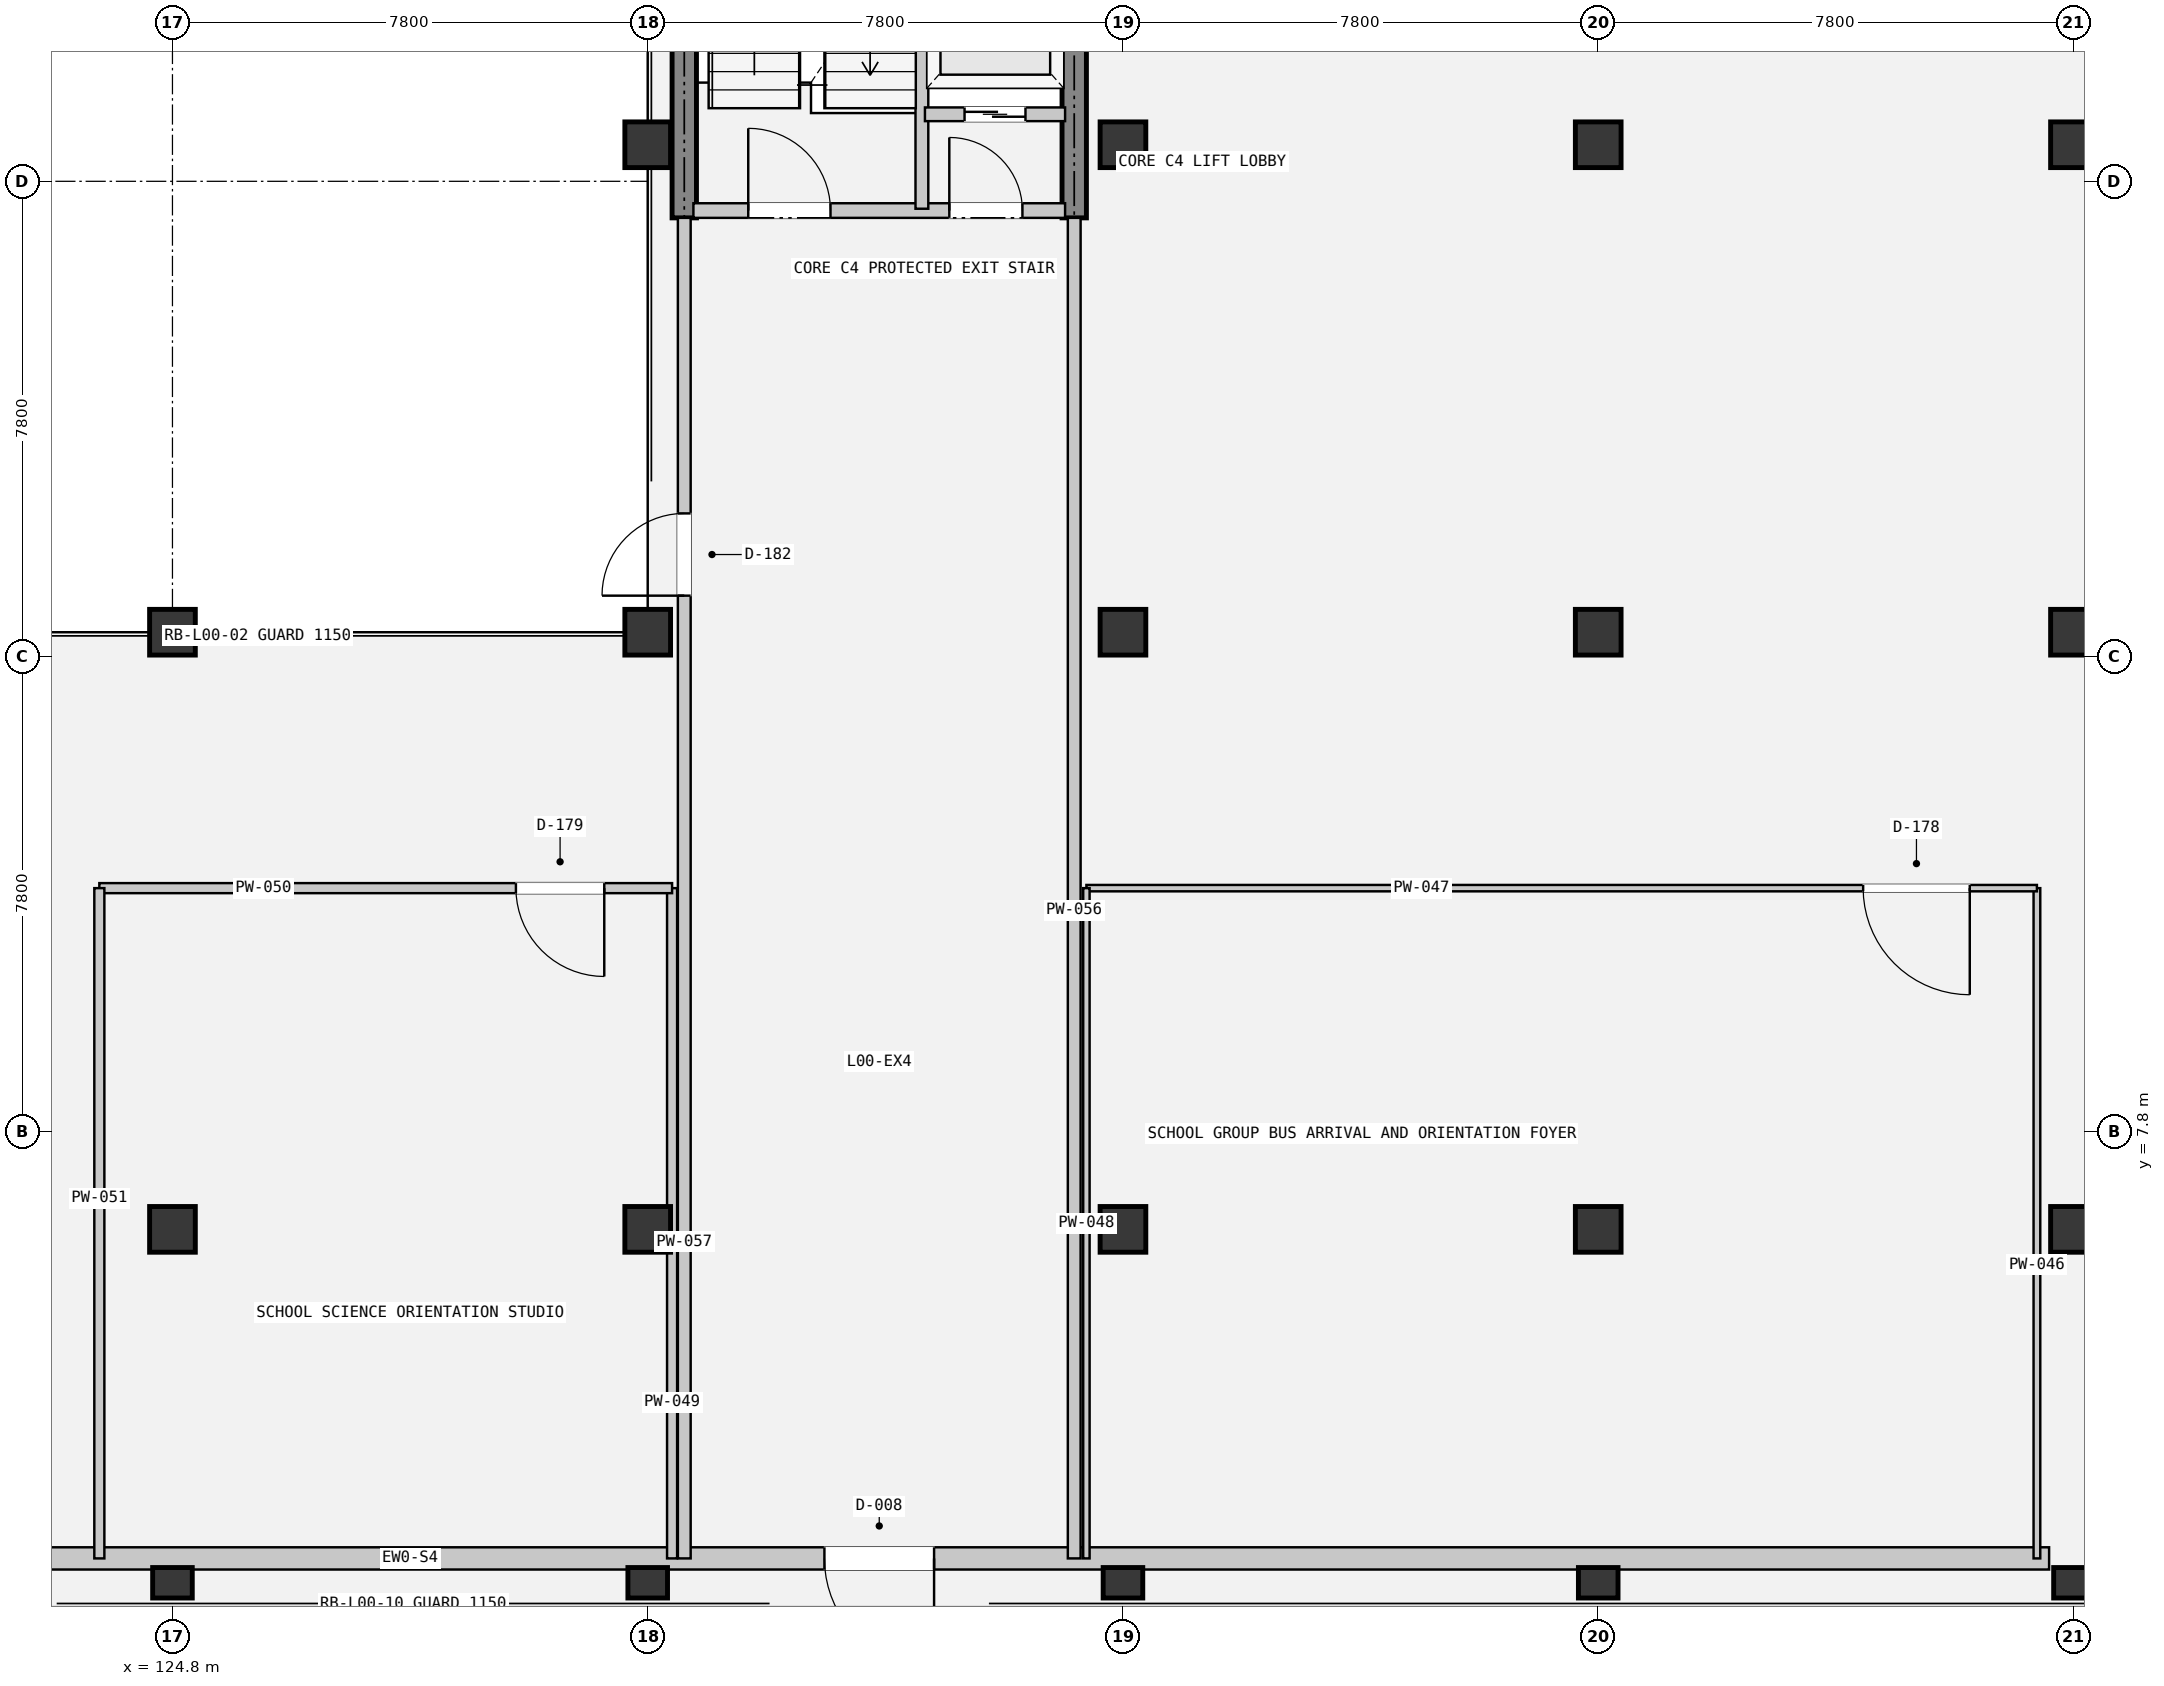
"""IFC4 building model, lengths in metres.
Left out: names, types, materials, properties, quantities, classifications, styles, units other than length and angle.
Written with IfcOpenShell. Run it as: python <this file> out.ifc"""

import sys

from ifc_helpers import new_model, si_unit, direction, frame, frame_2d, origin, origin_2d, place, context, subcontext, project, spatial, rectangle, extrude, element, fill, save


model = new_model("IFC4")
c1 = context("Model", 3, precision=1e-05, world=origin(), true_north=direction((0.0, 1.0)))
c2 = subcontext(c1, "Body", "Model", "MODEL_VIEW")
j1 = project(units=[si_unit("LENGTHUNIT", "METRE"), si_unit("PLANEANGLEUNIT", "RADIAN")], contexts=[c1])
p1 = place(None, origin())
s1 = spatial("IfcSite", under=j1, at=p1, CompositionType="ELEMENT")
p2 = place(p1, origin())
s2 = spatial("IfcBuilding", under=s1, at=p2, CompositionType="ELEMENT")
p3 = place(p2, origin())
s3 = spatial("IfcBuildingStorey", under=s2, at=p3, CompositionType="ELEMENT", Elevation=0.0)
p4 = place(p3, frame((124.8, 0.4, 0.0), z_axis=(0.0, 0.0, 1.0), x_axis=(1.0, 0.0, 0.0)))
e1 = element("IfcColumn", 1, at=p4, inside=s3, PredefinedType="COLUMN", context=c2, shape_type="SweptSolid", body=[
    extrude(rectangle(XDim=0.65, YDim=0.5, at=origin_2d()), origin(), (0.0, 0.0, 1.0), 5.4),
])
for number, where, z_axis, x_axis in (
    (2, (124.8, 6.2, 0.0), (0.0, 0.0, 1.0), (1.0, 0.0, 0.0)),
    (3, (124.8, 16.0, 0.0), (0.0, 0.0, 1.0), (1.0, 0.0, 0.0)),
):
    element("IfcColumn", number, at=place(p3, frame(where, z_axis=z_axis, x_axis=x_axis)), inside=s3, PredefinedType="COLUMN", context=c2, shape_type="SweptSolid", body=[
        extrude(rectangle(XDim=0.75, YDim=0.75, at=origin_2d()), origin(), (0.0, 0.0, 1.0), 5.4),
    ])
p5 = place(p3, frame((132.6, 0.4, 0.0), z_axis=(0.0, 0.0, 1.0), x_axis=(1.0, 0.0, 0.0)))
e4 = element("IfcColumn", 4, at=p5, inside=s3, PredefinedType="COLUMN", context=c2, shape_type="SweptSolid", body=[
    extrude(rectangle(XDim=0.65, YDim=0.5, at=origin_2d()), origin(), (0.0, 0.0, 1.0), 5.4),
])
for number, where, z_axis, x_axis in (
    (5, (132.6, 6.2, 0.0), (0.0, 0.0, 1.0), (1.0, 0.0, 0.0)),
    (6, (132.6, 16.0, 0.0), (0.0, 0.0, 1.0), (1.0, 0.0, 0.0)),
    (7, (132.6, 24.0, 0.0), (0.0, 0.0, 1.0), (1.0, 0.0, 0.0)),
):
    element("IfcColumn", number, at=place(p3, frame(where, z_axis=z_axis, x_axis=x_axis)), inside=s3, PredefinedType="COLUMN", context=c2, shape_type="SweptSolid", body=[
        extrude(rectangle(XDim=0.75, YDim=0.75, at=origin_2d()), origin(), (0.0, 0.0, 1.0), 5.4),
    ])
p6 = place(p3, frame((140.4, 0.4, 0.0), z_axis=(0.0, 0.0, 1.0), x_axis=(1.0, 0.0, 0.0)))
e8 = element("IfcColumn", 8, at=p6, inside=s3, PredefinedType="COLUMN", context=c2, shape_type="SweptSolid", body=[
    extrude(rectangle(XDim=0.65, YDim=0.5, at=origin_2d()), origin(), (0.0, 0.0, 1.0), 5.4),
])
for number, where, z_axis, x_axis in (
    (9, (140.4, 6.2, 0.0), (0.0, 0.0, 1.0), (1.0, 0.0, 0.0)),
    (10, (140.4, 16.0, 0.0), (0.0, 0.0, 1.0), (1.0, 0.0, 0.0)),
    (11, (140.4, 24.0, 0.0), (0.0, 0.0, 1.0), (1.0, 0.0, 0.0)),
):
    element("IfcColumn", number, at=place(p3, frame(where, z_axis=z_axis, x_axis=x_axis)), inside=s3, PredefinedType="COLUMN", context=c2, shape_type="SweptSolid", body=[
        extrude(rectangle(XDim=0.75, YDim=0.75, at=origin_2d()), origin(), (0.0, 0.0, 1.0), 5.4),
    ])
p7 = place(p3, frame((148.2, 0.4, 0.0), z_axis=(0.0, 0.0, 1.0), x_axis=(1.0, 0.0, 0.0)))
e12 = element("IfcColumn", 12, at=p7, inside=s3, PredefinedType="COLUMN", context=c2, shape_type="SweptSolid", body=[
    extrude(rectangle(XDim=0.65, YDim=0.5, at=origin_2d()), origin(), (0.0, 0.0, 1.0), 5.4),
])
for number, where, z_axis, x_axis in (
    (13, (148.2, 6.2, 0.0), (0.0, 0.0, 1.0), (1.0, 0.0, 0.0)),
    (14, (148.2, 16.0, 0.0), (0.0, 0.0, 1.0), (1.0, 0.0, 0.0)),
    (15, (148.2, 24.0, 0.0), (0.0, 0.0, 1.0), (1.0, 0.0, 0.0)),
):
    element("IfcColumn", number, at=place(p3, frame(where, z_axis=z_axis, x_axis=x_axis)), inside=s3, PredefinedType="COLUMN", context=c2, shape_type="SweptSolid", body=[
        extrude(rectangle(XDim=0.75, YDim=0.75, at=origin_2d()), origin(), (0.0, 0.0, 1.0), 5.4),
    ])
p8 = place(p3, frame((156.0, 0.4, 0.0), z_axis=(0.0, 0.0, 1.0), x_axis=(1.0, 0.0, 0.0)))
e16 = element("IfcColumn", 16, at=p8, inside=s3, PredefinedType="COLUMN", context=c2, shape_type="SweptSolid", body=[
    extrude(rectangle(XDim=0.65, YDim=0.5, at=origin_2d()), origin(), (0.0, 0.0, 1.0), 5.4),
])
for number, where, z_axis, x_axis in (
    (17, (156.0, 6.2, 0.0), (0.0, 0.0, 1.0), (1.0, 0.0, 0.0)),
    (18, (156.0, 16.0, 0.0), (0.0, 0.0, 1.0), (1.0, 0.0, 0.0)),
    (19, (156.0, 24.0, 0.0), (0.0, 0.0, 1.0), (1.0, 0.0, 0.0)),
):
    element("IfcColumn", number, at=place(p3, frame(where, z_axis=z_axis, x_axis=x_axis)), inside=s3, PredefinedType="COLUMN", context=c2, shape_type="SweptSolid", body=[
        extrude(rectangle(XDim=0.75, YDim=0.75, at=origin_2d()), origin(), (0.0, 0.0, 1.0), 5.4),
    ])
for number, where, z_axis, x_axis in (
    (20, (133.2, 22.8, 0.0), (0.0, 0.0, 1.0), (0.0, 1.0, 0.0)),
    (21, (139.6, 22.8, 0.0), (0.0, 0.0, 1.0), (0.0, 1.0, 0.0)),
):
    element("IfcWall", number, at=place(p3, frame(where, z_axis=z_axis, x_axis=x_axis)), inside=s3, PredefinedType="SHEAR", context=c2, shape_type="SweptSolid", body=[
        extrude(rectangle(XDim=8.6, YDim=0.4, at=frame_2d((4.3, 0.0))), origin(), (0.0, 0.0, 1.0), 5.4),
    ])
p9 = place(p3, frame((155.6, 0.8, 0.0), z_axis=(0.0, 0.0, 1.0), x_axis=(-1.0, 0.0, 0.0)))
e22 = element("IfcWall", 22, at=p9, inside=s3, PredefinedType="SOLIDWALL", context=c2, shape_type="SweptSolid", body=[
    extrude(rectangle(XDim=46.0, YDim=0.365, at=frame_2d((23.0, 0.0))), origin(), (0.0, 0.0, 1.0), 4.46),
])
p10 = place(p9, frame((33.6, 0.0, 0.0)))
e23 = element("IfcOpeningElement", 23, at=p10, cuts=e22, PredefinedType="OPENING", context=c2, shape_type="SweptSolid", body=[
    extrude(rectangle(XDim=1.8, YDim=2.4, at=frame_2d((0.9, 1.2))), frame((0.0, 0.192, 0.0), z_axis=(0.0, -1.0, 0.0), x_axis=(1.0, 0.0, 0.0)), (0.0, 0.0, 1.0), 0.385),
])
p11 = place(p9, frame((18.3, 0.0, 0.0)))
e24 = element("IfcOpeningElement", 24, at=p11, cuts=e22, PredefinedType="OPENING", context=c2, shape_type="SweptSolid", body=[
    extrude(rectangle(XDim=1.8, YDim=2.4, at=frame_2d((0.9, 1.2))), frame((0.0, 0.192, 0.0), z_axis=(0.0, -1.0, 0.0), x_axis=(1.0, 0.0, 0.0)), (0.0, 0.0, 1.0), 0.385),
])
p12 = place(p3, frame((133.35, 22.92, 0.0), z_axis=(0.0, 0.0, 1.0), x_axis=(1.0, 0.0, 0.0)))
e25 = element("IfcWall", 25, at=p12, inside=s3, PredefinedType="PARTITIONING", context=c2, shape_type="SweptSolid", body=[
    extrude(rectangle(XDim=6.1, YDim=0.24, at=frame_2d((3.05, 0.0))), origin(), (0.0, 0.0, 1.0), 4.46),
])
p13 = place(p12, frame((0.9, 0.0, 0.0)))
e26 = element("IfcOpeningElement", 26, at=p13, cuts=e25, PredefinedType="OPENING", context=c2, shape_type="SweptSolid", body=[
    extrude(rectangle(XDim=1.35, YDim=2.2, at=frame_2d((0.675, 1.1))), frame((0.0, 0.13, 0.0), z_axis=(0.0, -1.0, 0.0), x_axis=(1.0, 0.0, 0.0)), (0.0, 0.0, 1.0), 0.26),
])
p14 = place(p12, frame((4.2, 0.0, 0.0)))
e27 = element("IfcOpeningElement", 27, at=p14, cuts=e25, PredefinedType="OPENING", context=c2, shape_type="SweptSolid", body=[
    extrude(rectangle(XDim=1.2, YDim=2.2, at=frame_2d((0.6, 1.1))), frame((0.0, 0.13, 0.0), z_axis=(0.0, -1.0, 0.0), x_axis=(1.0, 0.0, 0.0)), (0.0, 0.0, 1.0), 0.26),
])
p15 = place(p3, frame((137.1, 22.95, 0.0), z_axis=(0.0, 0.0, 1.0), x_axis=(0.0, 1.0, 0.0)))
e28 = element("IfcWall", 28, at=p15, inside=s3, PredefinedType="PARTITIONING", context=c2, shape_type="SweptSolid", body=[
    extrude(rectangle(XDim=8.3, YDim=0.21, at=frame_2d((4.15, 0.0))), origin(), (0.0, 0.0, 1.0), 4.46),
])
p16 = place(p3, frame((137.15, 24.5, 0.0), z_axis=(0.0, 0.0, 1.0), x_axis=(1.0, 0.0, 0.0)))
e29 = element("IfcWall", 29, at=p16, inside=s3, PredefinedType="PARTITIONING", context=c2, shape_type="SweptSolid", body=[
    extrude(rectangle(XDim=2.3, YDim=0.225, at=frame_2d((1.15, 0.0))), origin(), (0.0, 0.0, 1.0), 4.46),
])
p17 = place(p16, frame((0.65, 0.0, 0.0)))
e30 = element("IfcOpeningElement", 30, at=p17, cuts=e29, PredefinedType="OPENING", context=c2, shape_type="SweptSolid", body=[
    extrude(rectangle(XDim=1.0, YDim=2.15, at=frame_2d((0.5, 1.075))), frame((0.0, 0.123, 0.0), z_axis=(0.0, -1.0, 0.0), x_axis=(1.0, 0.0, 0.0)), (0.0, 0.0, 1.0), 0.245),
])
p18 = place(p3, frame((155.4, 0.8, 0.0), z_axis=(0.0, 0.0, 1.0), x_axis=(0.0, 1.0, 0.0)))
e31 = element("IfcWall", 31, at=p18, inside=s3, PredefinedType="PARTITIONING", context=c2, shape_type="SweptSolid", body=[
    extrude(rectangle(XDim=11.0, YDim=0.11, at=frame_2d((5.5, 0.0))), origin(), (0.0, 0.0, 1.0), 3.45),
])
p19 = place(p3, frame((155.4, 11.8, 0.0), z_axis=(0.0, 0.0, 1.0), x_axis=(-1.0, 0.0, 0.0)))
e32 = element("IfcWall", 32, at=p19, inside=s3, PredefinedType="PARTITIONING", context=c2, shape_type="SweptSolid", body=[
    extrude(rectangle(XDim=15.6, YDim=0.105, at=frame_2d((7.8, 0.0))), origin(), (0.0, 0.0, 1.0), 3.45),
])
p20 = place(p19, frame((1.102, 0.0, 0.0)))
e33 = element("IfcOpeningElement", 33, at=p20, cuts=e32, PredefinedType="OPENING", context=c2, shape_type="SweptSolid", body=[
    extrude(rectangle(XDim=1.75, YDim=2.4, at=frame_2d((0.875, 1.2))), frame((0.0, 0.062, 0.0), z_axis=(0.0, -1.0, 0.0), x_axis=(1.0, 0.0, 0.0)), (0.0, 0.0, 1.0), 0.125),
])
p21 = place(p3, frame((139.8, 11.8, 0.0), z_axis=(0.0, 0.0, 1.0), x_axis=(0.0, -1.0, 0.0)))
e34 = element("IfcWall", 34, at=p21, inside=s3, PredefinedType="PARTITIONING", context=c2, shape_type="SweptSolid", body=[
    extrude(rectangle(XDim=11.0, YDim=0.105, at=frame_2d((5.5, 0.0))), origin(), (0.0, 0.0, 1.0), 3.45),
])
p22 = place(p3, frame((133.0, 0.8, 0.0), z_axis=(0.0, 0.0, 1.0), x_axis=(0.0, 1.0, 0.0)))
e35 = element("IfcWall", 35, at=p22, inside=s3, PredefinedType="PARTITIONING", context=c2, shape_type="SweptSolid", body=[
    extrude(rectangle(XDim=11.0, YDim=0.165, at=frame_2d((5.5, 0.0))), origin(), (0.0, 0.0, 1.0), 3.45),
])
p23 = place(p3, frame((133.0, 11.8, 0.0), z_axis=(0.0, 0.0, 1.0), x_axis=(-1.0, 0.0, 0.0)))
e36 = element("IfcWall", 36, at=p23, inside=s3, PredefinedType="PARTITIONING", context=c2, shape_type="SweptSolid", body=[
    extrude(rectangle(XDim=9.4, YDim=0.165, at=frame_2d((4.7, 0.0))), origin(), (0.0, 0.0, 1.0), 3.45),
])
p24 = place(p23, frame((1.113, 0.0, 0.0)))
e37 = element("IfcOpeningElement", 37, at=p24, cuts=e36, PredefinedType="OPENING", context=c2, shape_type="SweptSolid", body=[
    extrude(rectangle(XDim=1.45, YDim=2.2, at=frame_2d((0.725, 1.1))), frame((0.0, 0.093, 0.0), z_axis=(0.0, -1.0, 0.0), x_axis=(1.0, 0.0, 0.0)), (0.0, 0.0, 1.0), 0.185),
])
p25 = place(p3, frame((123.6, 11.8, 0.0), z_axis=(0.0, 0.0, 1.0), x_axis=(0.0, -1.0, 0.0)))
e38 = element("IfcWall", 38, at=p25, inside=s3, PredefinedType="PARTITIONING", context=c2, shape_type="SweptSolid", body=[
    extrude(rectangle(XDim=11.0, YDim=0.165, at=frame_2d((5.5, 0.0))), origin(), (0.0, 0.0, 1.0), 3.45),
])
p26 = place(p3, frame((139.6, 0.8, 0.0), z_axis=(0.0, 0.0, 1.0), x_axis=(0.0, 1.0, 0.0)))
e39 = element("IfcWall", 39, at=p26, inside=s3, PredefinedType="PARTITIONING", context=c2, shape_type="SweptSolid", body=[
    extrude(rectangle(XDim=22.0, YDim=0.21, at=frame_2d((11.0, 0.0))), origin(), (0.0, 0.0, 1.0), 3.45),
])
p27 = place(p3, frame((133.2, 0.8, 0.0), z_axis=(0.0, 0.0, 1.0), x_axis=(0.0, 1.0, 0.0)))
e40 = element("IfcWall", 40, at=p27, inside=s3, PredefinedType="PARTITIONING", context=c2, shape_type="SweptSolid", body=[
    extrude(rectangle(XDim=22.0, YDim=0.21, at=frame_2d((11.0, 0.0))), origin(), (0.0, 0.0, 1.0), 3.45),
])
p28 = place(p27, frame((15.8, 0.0, 0.0)))
e41 = element("IfcOpeningElement", 41, at=p28, cuts=e40, PredefinedType="OPENING", context=c2, shape_type="SweptSolid", body=[
    extrude(rectangle(XDim=1.35, YDim=2.2, at=frame_2d((0.675, 1.1))), frame((0.0, 0.115, 0.0), z_axis=(0.0, -1.0, 0.0), x_axis=(1.0, 0.0, 0.0)), (0.0, 0.0, 1.0), 0.23),
])
p29 = place(p11, origin())
e42 = element("IfcDoor", 42, at=p29, inside=s3, OperationType="DOUBLE_DOOR_SINGLE_SWING", PredefinedType="DOOR", context=c2, shape_type="SweptSolid", body=[
    extrude(rectangle(XDim=1.8, YDim=2.4, at=frame_2d((0.9, 1.2))), frame((0.0, 0.025, 0.0), z_axis=(0.0, -1.0, 0.0), x_axis=(1.0, 0.0, 0.0)), (0.0, 0.0, 1.0), 0.05),
])
fill(e24, e42)
p30 = place(p13, origin())
e43 = element("IfcDoor", 43, at=p30, inside=s3, OperationType="SINGLE_SWING_RIGHT", PredefinedType="DOOR", context=c2, shape_type="SweptSolid", body=[
    extrude(rectangle(XDim=1.35, YDim=2.2, at=frame_2d((0.675, 1.1))), frame((0.0, 0.025, 0.0), z_axis=(0.0, -1.0, 0.0), x_axis=(1.0, 0.0, 0.0)), (0.0, 0.0, 1.0), 0.05),
])
fill(e26, e43)
p31 = place(p14, origin())
e44 = element("IfcDoor", 44, at=p31, inside=s3, OperationType="SINGLE_SWING_LEFT", PredefinedType="DOOR", context=c2, shape_type="SweptSolid", body=[
    extrude(rectangle(XDim=1.2, YDim=2.2, at=frame_2d((0.6, 1.1))), frame((0.0, 0.025, 0.0), z_axis=(0.0, -1.0, 0.0), x_axis=(1.0, 0.0, 0.0)), (0.0, 0.0, 1.0), 0.05),
])
fill(e27, e44)
p32 = place(p17, origin())
e45 = element("IfcDoor", 45, at=p32, inside=s3, OperationType="SLIDING_TO_RIGHT", PredefinedType="DOOR", context=c2, shape_type="SweptSolid", body=[
    extrude(rectangle(XDim=1.0, YDim=2.15, at=frame_2d((0.5, 1.075))), frame((0.0, 0.025, 0.0), z_axis=(0.0, -1.0, 0.0), x_axis=(1.0, 0.0, 0.0)), (0.0, 0.0, 1.0), 0.05),
])
fill(e30, e45)
p33 = place(p20, origin())
e46 = element("IfcDoor", 46, at=p33, inside=s3, OperationType="DOUBLE_DOOR_SINGLE_SWING", PredefinedType="DOOR", context=c2, shape_type="SweptSolid", body=[
    extrude(rectangle(XDim=1.75, YDim=2.4, at=frame_2d((0.875, 1.2))), frame((0.0, 0.025, 0.0), z_axis=(0.0, -1.0, 0.0), x_axis=(1.0, 0.0, 0.0)), (0.0, 0.0, 1.0), 0.05),
])
fill(e33, e46)
p34 = place(p24, origin())
e47 = element("IfcDoor", 47, at=p34, inside=s3, OperationType="SINGLE_SWING_RIGHT", PredefinedType="DOOR", context=c2, shape_type="SweptSolid", body=[
    extrude(rectangle(XDim=1.45, YDim=2.2, at=frame_2d((0.725, 1.1))), frame((0.0, 0.025, 0.0), z_axis=(0.0, -1.0, 0.0), x_axis=(1.0, 0.0, 0.0)), (0.0, 0.0, 1.0), 0.05),
])
fill(e37, e47)
p35 = place(p28, origin())
e48 = element("IfcDoor", 48, at=p35, inside=s3, OperationType="SINGLE_SWING_LEFT", PredefinedType="DOOR", context=c2, shape_type="SweptSolid", body=[
    extrude(rectangle(XDim=1.35, YDim=2.2, at=frame_2d((0.675, 1.1))), frame((0.0, 0.025, 0.0), z_axis=(0.0, -1.0, 0.0), x_axis=(1.0, 0.0, 0.0)), (0.0, 0.0, 1.0), 0.05),
])
fill(e41, e48)
save(model, sys.argv[1])
